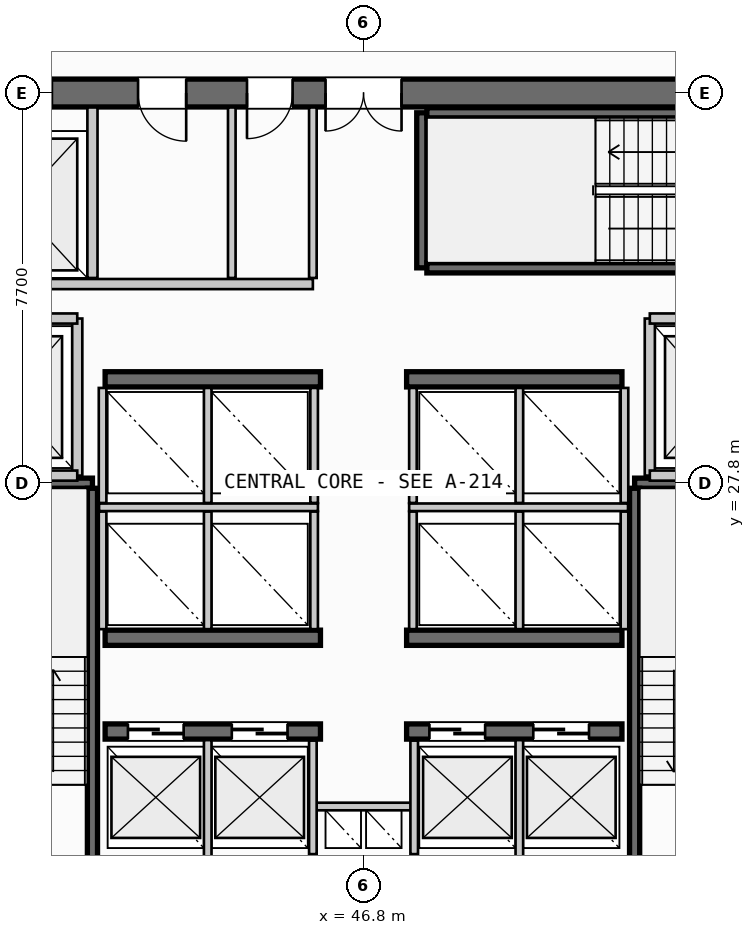
"""IFC4 building model, lengths in metres.
Left out: names, types, materials, properties, quantities, classifications, styles, units other than length and angle.
Written with IfcOpenShell. Run it as: python <this file> out.ifc"""

import sys

from ifc_helpers import new_model, si_unit, direction, frame, frame_2d, origin, place, context, subcontext, project, spatial, rectangle, extrude, source, transform, mapped, element, fill, save


model = new_model("IFC4")
c1 = context("Model", 3, precision=1e-05, world=origin(), true_north=direction((0.0, 1.0)))
c2 = subcontext(c1, "Body", "Model", "MODEL_VIEW")
j1 = project(units=[si_unit("LENGTHUNIT", "METRE"), si_unit("PLANEANGLEUNIT", "RADIAN")], contexts=[c1])
p1 = place(None, origin())
s1 = spatial("IfcSite", under=j1, at=p1, CompositionType="ELEMENT")
p2 = place(p1, origin())
s2 = spatial("IfcBuilding", under=s1, at=p2, CompositionType="ELEMENT")
p3 = place(p2, frame((0.0, 0.0, 100.0)))
s3 = spatial("IfcBuildingStorey", under=s2, at=p3, CompositionType="ELEMENT", Elevation=100.0)
p4 = place(p3, frame((55.6, 35.5, 0.0), z_axis=(0.0, 0.0, 1.0), x_axis=(-1.0, 0.0, 0.0)))
e1 = element("IfcWall", 1, at=p4, inside=s3, PredefinedType="SHEAR", context=c2, shape_type="SweptSolid", body=[
    extrude(rectangle(XDim=17.6, YDim=0.55, at=frame_2d((8.8, 0.0))), origin(), (0.0, 0.0, 1.0), 3.35),
])
p5 = place(p4, frame((8.05, 0.0, 0.0)))
e2 = element("IfcOpeningElement", 2, at=p5, cuts=e1, PredefinedType="OPENING", context=c2, shape_type="SweptSolid", body=[
    extrude(rectangle(XDim=1.5, YDim=2.2, at=frame_2d((0.75, 1.1))), frame((0.0, 0.285, 0.0), z_axis=(0.0, -1.0, 0.0), x_axis=(1.0, 0.0, 0.0)), (0.0, 0.0, 1.0), 0.57),
])
p6 = place(p4, frame((14.95, 0.0, 0.0)))
e3 = element("IfcOpeningElement", 3, at=p6, cuts=e1, PredefinedType="OPENING", context=c2, shape_type="SweptSolid", body=[
    extrude(rectangle(XDim=1.4, YDim=2.3, at=frame_2d((0.7, 1.15))), frame((0.0, 0.285, 0.0), z_axis=(0.0, -1.0, 0.0), x_axis=(1.0, 0.0, 0.0)), (0.0, 0.0, 1.0), 0.57),
])
p7 = place(p4, frame((12.3, 0.0, 0.0)))
e4 = element("IfcOpeningElement", 4, at=p7, cuts=e1, PredefinedType="OPENING", context=c2, shape_type="SweptSolid", body=[
    extrude(rectangle(XDim=0.95, YDim=2.15, at=frame_2d((0.475, 1.075))), frame((0.0, 0.285, 0.0), z_axis=(0.0, -1.0, 0.0), x_axis=(1.0, 0.0, 0.0)), (0.0, 0.0, 1.0), 0.57),
])
p8 = place(p4, frame((10.2, 0.0, 0.0)))
e5 = element("IfcOpeningElement", 5, at=p8, cuts=e1, PredefinedType="OPENING", context=c2, shape_type="SweptSolid", body=[
    extrude(rectangle(XDim=0.9, YDim=2.15, at=frame_2d((0.45, 1.075))), frame((0.0, 0.285, 0.0), z_axis=(0.0, -1.0, 0.0), x_axis=(1.0, 0.0, 0.0)), (0.0, 0.0, 1.0), 0.57),
])
p9 = place(p3, frame((41.7, 22.9, 0.0), z_axis=(0.0, 0.0, 1.0), x_axis=(1.0, 0.0, 0.0)))
e6 = element("IfcWall", 6, at=p9, inside=s3, PredefinedType="SHEAR", context=c2, shape_type="SweptSolid", body=[
    extrude(rectangle(XDim=4.25, YDim=0.3, at=frame_2d((2.125, 0.0))), origin(), (0.0, 0.0, 1.0), 3.35),
])
p10 = place(p9, frame((0.45, 0.0, 0.0)))
e7 = element("IfcOpeningElement", 7, at=p10, cuts=e6, PredefinedType="OPENING", context=c2, shape_type="SweptSolid", body=[
    extrude(rectangle(XDim=1.1, YDim=2.2, at=frame_2d((0.55, 1.1))), frame((0.0, 0.16, 0.0), z_axis=(0.0, -1.0, 0.0), x_axis=(1.0, 0.0, 0.0)), (0.0, 0.0, 1.0), 0.32),
])
p11 = place(p9, frame((2.5, 0.0, 0.0)))
e8 = element("IfcOpeningElement", 8, at=p11, cuts=e6, PredefinedType="OPENING", context=c2, shape_type="SweptSolid", body=[
    extrude(rectangle(XDim=1.1, YDim=2.2, at=frame_2d((0.55, 1.1))), frame((0.0, 0.16, 0.0), z_axis=(0.0, -1.0, 0.0), x_axis=(1.0, 0.0, 0.0)), (0.0, 0.0, 1.0), 0.32),
])
p12 = place(p3, frame((47.65, 22.9, 0.0), z_axis=(0.0, 0.0, 1.0), x_axis=(1.0, 0.0, 0.0)))
e9 = element("IfcWall", 9, at=p12, inside=s3, PredefinedType="SHEAR", context=c2, shape_type="SweptSolid", body=[
    extrude(rectangle(XDim=4.25, YDim=0.3, at=frame_2d((2.125, 0.0))), origin(), (0.0, 0.0, 1.0), 3.35),
])
p13 = place(p12, frame((0.45, 0.0, 0.0)))
e10 = element("IfcOpeningElement", 10, at=p13, cuts=e9, PredefinedType="OPENING", context=c2, shape_type="SweptSolid", body=[
    extrude(rectangle(XDim=1.1, YDim=2.2, at=frame_2d((0.55, 1.1))), frame((0.0, 0.16, 0.0), z_axis=(0.0, -1.0, 0.0), x_axis=(1.0, 0.0, 0.0)), (0.0, 0.0, 1.0), 0.32),
])
p14 = place(p12, frame((2.5, 0.0, 0.0)))
e11 = element("IfcOpeningElement", 11, at=p14, cuts=e9, PredefinedType="OPENING", context=c2, shape_type="SweptSolid", body=[
    extrude(rectangle(XDim=1.1, YDim=2.2, at=frame_2d((0.55, 1.1))), frame((0.0, 0.16, 0.0), z_axis=(0.0, -1.0, 0.0), x_axis=(1.0, 0.0, 0.0)), (0.0, 0.0, 1.0), 0.32),
])
for number, where, z_axis, x_axis in (
    (12, (41.7, 24.75, 0.0), (0.0, 0.0, 1.0), (1.0, 0.0, 0.0)),
    (13, (47.65, 24.75, 0.0), (0.0, 0.0, 1.0), (1.0, 0.0, 0.0)),
    (14, (41.7, 29.85, 0.0), (0.0, 0.0, 1.0), (1.0, 0.0, 0.0)),
    (15, (47.65, 29.85, 0.0), (0.0, 0.0, 1.0), (1.0, 0.0, 0.0)),
):
    element("IfcWall", number, at=place(p3, frame(where, z_axis=z_axis, x_axis=x_axis)), inside=s3, PredefinedType="SHEAR", context=c2, shape_type="SweptSolid", body=[
        extrude(rectangle(XDim=4.25, YDim=0.3, at=frame_2d((2.125, 0.0))), origin(), (0.0, 0.0, 1.0), 3.35),
    ])
p15 = place(p3, frame((38.39, 27.8, 0.0), z_axis=(0.0, 0.0, 1.0), x_axis=(1.0, 0.0, 0.0)))
e16 = element("IfcWall", 16, at=p15, inside=s3, PredefinedType="SHEAR", context=c2, shape_type="SweptSolid", body=[
    extrude(rectangle(XDim=3.06, YDim=0.2, at=frame_2d((1.53, 0.0))), origin(), (0.0, 0.0, 1.0), 3.35),
])
p16 = place(p3, frame((41.45, 27.7, 0.0), z_axis=(0.0, 0.0, 1.0), x_axis=(0.0, -1.0, 0.0)))
e17 = element("IfcWall", 17, at=p16, inside=s3, PredefinedType="SHEAR", context=c2, shape_type="SweptSolid", body=[
    extrude(rectangle(XDim=7.35, YDim=0.2, at=frame_2d((3.675, 0.0))), origin(), (0.0, 0.0, 1.0), 3.35),
])
p17 = place(p3, frame((52.15, 27.8, 0.0), z_axis=(0.0, 0.0, 1.0), x_axis=(1.0, 0.0, 0.0)))
e18 = element("IfcWall", 18, at=p17, inside=s3, PredefinedType="SHEAR", context=c2, shape_type="SweptSolid", body=[
    extrude(rectangle(XDim=3.06, YDim=0.2, at=frame_2d((1.53, 0.0))), origin(), (0.0, 0.0, 1.0), 3.35),
])
p18 = place(p3, frame((52.15, 20.35, 0.0), z_axis=(0.0, 0.0, 1.0), x_axis=(0.0, 1.0, 0.0)))
e19 = element("IfcWall", 19, at=p18, inside=s3, PredefinedType="SHEAR", context=c2, shape_type="SweptSolid", body=[
    extrude(rectangle(XDim=7.35, YDim=0.2, at=frame_2d((3.675, 0.0))), origin(), (0.0, 0.0, 1.0), 3.35),
])
p19 = place(p3, frame((47.95, 32.05, 0.0), z_axis=(0.0, 0.0, 1.0), x_axis=(0.0, 1.0, 0.0)))
e20 = element("IfcWall", 20, at=p19, inside=s3, PredefinedType="SHEAR", context=c2, shape_type="SweptSolid", body=[
    extrude(rectangle(XDim=3.06, YDim=0.2, at=frame_2d((1.53, 0.0))), origin(), (0.0, 0.0, 1.0), 3.35),
])
for number, where, z_axis, x_axis in (
    (21, (48.05, 35.11, 0.0), (0.0, 0.0, 1.0), (1.0, 0.0, 0.0)),
    (22, (55.4, 32.05, 0.0), (0.0, 0.0, 1.0), (-1.0, 0.0, 0.0)),
):
    element("IfcWall", number, at=place(p3, frame(where, z_axis=z_axis, x_axis=x_axis)), inside=s3, PredefinedType="SHEAR", context=c2, shape_type="SweptSolid", body=[
        extrude(rectangle(XDim=7.35, YDim=0.2, at=frame_2d((3.675, 0.0))), origin(), (0.0, 0.0, 1.0), 3.35),
    ])
p20 = place(p3, frame((45.8, 21.42, 0.0), z_axis=(0.0, 0.0, 1.0), x_axis=(1.0, 0.0, 0.0)))
e23 = element("IfcWall", 23, at=p20, inside=s3, PredefinedType="PARTITIONING", context=c2, shape_type="SweptSolid", body=[
    extrude(rectangle(XDim=2.0, YDim=0.15, at=frame_2d((1.0, 0.0))), origin(), (0.0, 0.0, 1.0), 2.28),
])
for number, where, z_axis, x_axis in (
    (24, (45.8, 20.48, 0.0), (0.0, 0.0, 1.0), (0.0, 1.0, 0.0)),
    (25, (47.8, 20.48, 0.0), (0.0, 0.0, 1.0), (0.0, 1.0, 0.0)),
):
    element("IfcWall", number, at=place(p3, frame(where, z_axis=z_axis, x_axis=x_axis)), inside=s3, PredefinedType="PARTITIONING", context=c2, shape_type="SweptSolid", body=[
        extrude(rectangle(XDim=2.24, YDim=0.15, at=frame_2d((1.12, 0.0))), origin(), (0.0, 0.0, 1.0), 2.28),
    ])
p21 = place(p3, frame((41.15, 27.95, 0.0), z_axis=(0.0, 0.0, 1.0), x_axis=(0.0, 1.0, 0.0)))
e26 = element("IfcWall", 26, at=p21, inside=s3, PredefinedType="PARTITIONING", context=c2, shape_type="SweptSolid", body=[
    extrude(rectangle(XDim=3.1, YDim=0.2, at=frame_2d((1.55, 0.0))), origin(), (0.0, 0.0, 1.0), 2.28),
])
for number, where, z_axis, x_axis in (
    (27, (38.285, 27.95, 0.0), (0.0, 0.0, 1.0), (1.0, 0.0, 0.0)),
    (28, (38.285, 31.05, 0.0), (0.0, 0.0, 1.0), (1.0, 0.0, 0.0)),
):
    element("IfcWall", number, at=place(p3, frame(where, z_axis=z_axis, x_axis=x_axis)), inside=s3, PredefinedType="PARTITIONING", context=c2, shape_type="SweptSolid", body=[
        extrude(rectangle(XDim=2.865, YDim=0.2, at=frame_2d((1.433, 0.0))), origin(), (0.0, 0.0, 1.0), 2.28),
    ])
p22 = place(p3, frame((52.45, 27.95, 0.0), z_axis=(0.0, 0.0, 1.0), x_axis=(0.0, 1.0, 0.0)))
e29 = element("IfcWall", 29, at=p22, inside=s3, PredefinedType="PARTITIONING", context=c2, shape_type="SweptSolid", body=[
    extrude(rectangle(XDim=3.1, YDim=0.2, at=frame_2d((1.55, 0.0))), origin(), (0.0, 0.0, 1.0), 2.28),
])
for number, where, z_axis, x_axis in (
    (30, (52.45, 27.95, 0.0), (0.0, 0.0, 1.0), (1.0, 0.0, 0.0)),
    (31, (52.45, 31.05, 0.0), (0.0, 0.0, 1.0), (1.0, 0.0, 0.0)),
):
    element("IfcWall", number, at=place(p3, frame(where, z_axis=z_axis, x_axis=x_axis)), inside=s3, PredefinedType="PARTITIONING", context=c2, shape_type="SweptSolid", body=[
        extrude(rectangle(XDim=2.865, YDim=0.2, at=frame_2d((1.433, 0.0))), origin(), (0.0, 0.0, 1.0), 2.28),
    ])
for number, where, z_axis, x_axis in (
    (32, (43.725, 20.385, 0.0), (0.0, 0.0, 1.0), (0.0, 1.0, 0.0)),
    (33, (49.875, 20.385, 0.0), (0.0, 0.0, 1.0), (0.0, 1.0, 0.0)),
):
    element("IfcWall", number, at=place(p3, frame(where, z_axis=z_axis, x_axis=x_axis)), inside=s3, PredefinedType="PARTITIONING", context=c2, shape_type="SweptSolid", body=[
        extrude(rectangle(XDim=2.345, YDim=0.15, at=frame_2d((1.172, 0.0))), origin(), (0.0, 0.0, 1.0), 2.28),
    ])
p23 = place(p3, frame((41.58, 27.325, 0.0), z_axis=(0.0, 0.0, 1.0), x_axis=(1.0, 0.0, 0.0)))
e34 = element("IfcWall", 34, at=p23, inside=s3, PredefinedType="PARTITIONING", context=c2, shape_type="SweptSolid", body=[
    extrude(rectangle(XDim=4.32, YDim=0.15, at=frame_2d((2.16, 0.0))), origin(), (0.0, 0.0, 1.0), 2.28),
])
p24 = place(p3, frame((47.7, 27.325, 0.0), z_axis=(0.0, 0.0, 1.0), x_axis=(1.0, 0.0, 0.0)))
e35 = element("IfcWall", 35, at=p24, inside=s3, PredefinedType="PARTITIONING", context=c2, shape_type="SweptSolid", body=[
    extrude(rectangle(XDim=4.32, YDim=0.15, at=frame_2d((2.16, 0.0))), origin(), (0.0, 0.0, 1.0), 2.28),
])
for number, where, z_axis, x_axis in (
    (36, (41.65, 24.92, 0.0), (0.0, 0.0, 1.0), (0.0, 1.0, 0.0)),
    (37, (43.725, 24.92, 0.0), (0.0, 0.0, 1.0), (0.0, 1.0, 0.0)),
    (38, (45.825, 24.92, 0.0), (0.0, 0.0, 1.0), (0.0, 1.0, 0.0)),
    (39, (47.775, 24.92, 0.0), (0.0, 0.0, 1.0), (0.0, 1.0, 0.0)),
    (40, (49.875, 24.92, 0.0), (0.0, 0.0, 1.0), (0.0, 1.0, 0.0)),
    (41, (51.95, 24.92, 0.0), (0.0, 0.0, 1.0), (0.0, 1.0, 0.0)),
):
    element("IfcWall", number, at=place(p3, frame(where, z_axis=z_axis, x_axis=x_axis)), inside=s3, PredefinedType="PARTITIONING", context=c2, shape_type="SweptSolid", body=[
        extrude(rectangle(XDim=2.32, YDim=0.15, at=frame_2d((1.16, 0.0))), origin(), (0.0, 0.0, 1.0), 2.28),
    ])
for number, where, z_axis, x_axis in (
    (42, (41.65, 27.41, 0.0), (0.0, 0.0, 1.0), (0.0, 1.0, 0.0)),
    (43, (43.725, 27.41, 0.0), (0.0, 0.0, 1.0), (0.0, 1.0, 0.0)),
    (44, (45.825, 27.41, 0.0), (0.0, 0.0, 1.0), (0.0, 1.0, 0.0)),
    (45, (47.775, 27.41, 0.0), (0.0, 0.0, 1.0), (0.0, 1.0, 0.0)),
    (46, (49.875, 27.41, 0.0), (0.0, 0.0, 1.0), (0.0, 1.0, 0.0)),
    (47, (51.95, 27.41, 0.0), (0.0, 0.0, 1.0), (0.0, 1.0, 0.0)),
):
    element("IfcWall", number, at=place(p3, frame(where, z_axis=z_axis, x_axis=x_axis)), inside=s3, PredefinedType="PARTITIONING", context=c2, shape_type="SweptSolid", body=[
        extrude(rectangle(XDim=2.27, YDim=0.15, at=frame_2d((1.135, 0.0))), origin(), (0.0, 0.0, 1.0), 2.28),
    ])
p25 = place(p3, frame((41.45, 31.85, 0.0), z_axis=(0.0, 0.0, 1.0), x_axis=(0.0, 1.0, 0.0)))
e48 = element("IfcWall", 48, at=p25, inside=s3, PredefinedType="PARTITIONING", context=c2, shape_type="SweptSolid", body=[
    extrude(rectangle(XDim=3.365, YDim=0.2, at=frame_2d((1.683, 0.0))), origin(), (0.0, 0.0, 1.0), 2.28),
])
p26 = place(p3, frame((38.285, 31.73, 0.0), z_axis=(0.0, 0.0, 1.0), x_axis=(1.0, 0.0, 0.0)))
e49 = element("IfcWall", 49, at=p26, inside=s3, PredefinedType="PARTITIONING", context=c2, shape_type="SweptSolid", body=[
    extrude(rectangle(XDim=7.515, YDim=0.2, at=frame_2d((3.758, 0.0))), origin(), (0.0, 0.0, 1.0), 2.28),
])
p27 = place(p3, frame((45.8, 31.85, 0.0), z_axis=(0.0, 0.0, 1.0), x_axis=(0.0, 1.0, 0.0)))
e50 = element("IfcWall", 50, at=p27, inside=s3, PredefinedType="PARTITIONING", context=c2, shape_type="SweptSolid", body=[
    extrude(rectangle(XDim=3.365, YDim=0.15, at=frame_2d((1.683, 0.0))), origin(), (0.0, 0.0, 1.0), 2.28),
])
p28 = place(p3, frame((44.2, 31.85, 0.0), z_axis=(0.0, 0.0, 1.0), x_axis=(0.0, 1.0, 0.0)))
e51 = element("IfcWall", 51, at=p28, inside=s3, PredefinedType="PLUMBINGWALL", context=c2, shape_type="SweptSolid", body=[
    extrude(rectangle(XDim=3.365, YDim=0.15, at=frame_2d((1.683, 0.0))), origin(), (0.0, 0.0, 1.0), 2.28),
])
m1 = source(origin(), c2, "Body", "SweptSolid", [
    extrude(rectangle(XDim=1.5, YDim=2.2, at=frame_2d((0.75, 1.1))), frame((0.0, 0.025, 0.0), z_axis=(0.0, -1.0, 0.0), x_axis=(1.0, 0.0, 0.0)), (0.0, 0.0, 1.0), 0.05),
])
p29 = place(p5, origin())
e52 = element("IfcDoor", 52, at=p29, inside=s3, OperationType="DOUBLE_DOOR_SINGLE_SWING", PredefinedType="DOOR", context=c2, shape_type="MappedRepresentation", body=[
    mapped(m1, transform((0.0, 0.0, 0.0), scale=1.0)),
])
fill(e2, e52)
m2 = source(origin(), c2, "Body", "SweptSolid", [
    extrude(rectangle(XDim=1.1, YDim=2.2, at=frame_2d((0.55, 1.1))), frame((0.0, 0.025, 0.0), z_axis=(0.0, -1.0, 0.0), x_axis=(1.0, 0.0, 0.0)), (0.0, 0.0, 1.0), 0.05),
])
p30 = place(p10, origin())
e53 = element("IfcDoor", 53, at=p30, inside=s3, OperationType="SLIDING_TO_LEFT", PredefinedType="DOOR", context=c2, shape_type="MappedRepresentation", body=[
    mapped(m2, transform((0.0, 0.0, 0.0), scale=1.0)),
])
fill(e7, e53)
p31 = place(p11, origin())
e54 = element("IfcDoor", 54, at=p31, inside=s3, OperationType="SLIDING_TO_LEFT", PredefinedType="DOOR", context=c2, shape_type="MappedRepresentation", body=[
    mapped(m2, transform((0.0, 0.0, 0.0), scale=1.0)),
])
fill(e8, e54)
p32 = place(p13, origin())
e55 = element("IfcDoor", 55, at=p32, inside=s3, OperationType="SLIDING_TO_LEFT", PredefinedType="DOOR", context=c2, shape_type="MappedRepresentation", body=[
    mapped(m2, transform((0.0, 0.0, 0.0), scale=1.0)),
])
fill(e10, e55)
p33 = place(p14, origin())
e56 = element("IfcDoor", 56, at=p33, inside=s3, OperationType="SLIDING_TO_LEFT", PredefinedType="DOOR", context=c2, shape_type="MappedRepresentation", body=[
    mapped(m2, transform((0.0, 0.0, 0.0), scale=1.0)),
])
fill(e11, e56)
m3 = source(origin(), c2, "Body", "SweptSolid", [
    extrude(rectangle(XDim=1.4, YDim=2.3, at=frame_2d((0.7, 1.15))), frame((0.0, 0.025, 0.0), z_axis=(0.0, -1.0, 0.0), x_axis=(1.0, 0.0, 0.0)), (0.0, 0.0, 1.0), 0.05),
])
p34 = place(p6, origin())
e57 = element("IfcDoor", 57, at=p34, inside=s3, OperationType="SLIDING_TO_RIGHT", PredefinedType="DOOR", context=c2, shape_type="MappedRepresentation", body=[
    mapped(m3, transform((0.0, 0.0, 0.0), scale=1.0)),
])
fill(e3, e57)
m4 = source(origin(), c2, "Body", "SweptSolid", [
    extrude(rectangle(XDim=0.95, YDim=2.15, at=frame_2d((0.475, 1.075))), frame((0.0, 0.025, 0.0), z_axis=(0.0, -1.0, 0.0), x_axis=(1.0, 0.0, 0.0)), (0.0, 0.0, 1.0), 0.05),
])
p35 = place(p7, origin())
e58 = element("IfcDoor", 58, at=p35, inside=s3, OperationType="SINGLE_SWING_LEFT", PredefinedType="DOOR", context=c2, shape_type="MappedRepresentation", body=[
    mapped(m4, transform((0.0, 0.0, 0.0), scale=1.0)),
])
fill(e4, e58)
m5 = source(origin(), c2, "Body", "SweptSolid", [
    extrude(rectangle(XDim=0.9, YDim=2.15, at=frame_2d((0.45, 1.075))), frame((0.0, 0.025, 0.0), z_axis=(0.0, -1.0, 0.0), x_axis=(1.0, 0.0, 0.0)), (0.0, 0.0, 1.0), 0.05),
])
p36 = place(p8, origin())
e59 = element("IfcDoor", 59, at=p36, inside=s3, OperationType="SINGLE_SWING_RIGHT", PredefinedType="DOOR", context=c2, shape_type="MappedRepresentation", body=[
    mapped(m5, transform((0.0, 0.0, 0.0), scale=1.0)),
])
fill(e5, e59)
save(model, sys.argv[1])
